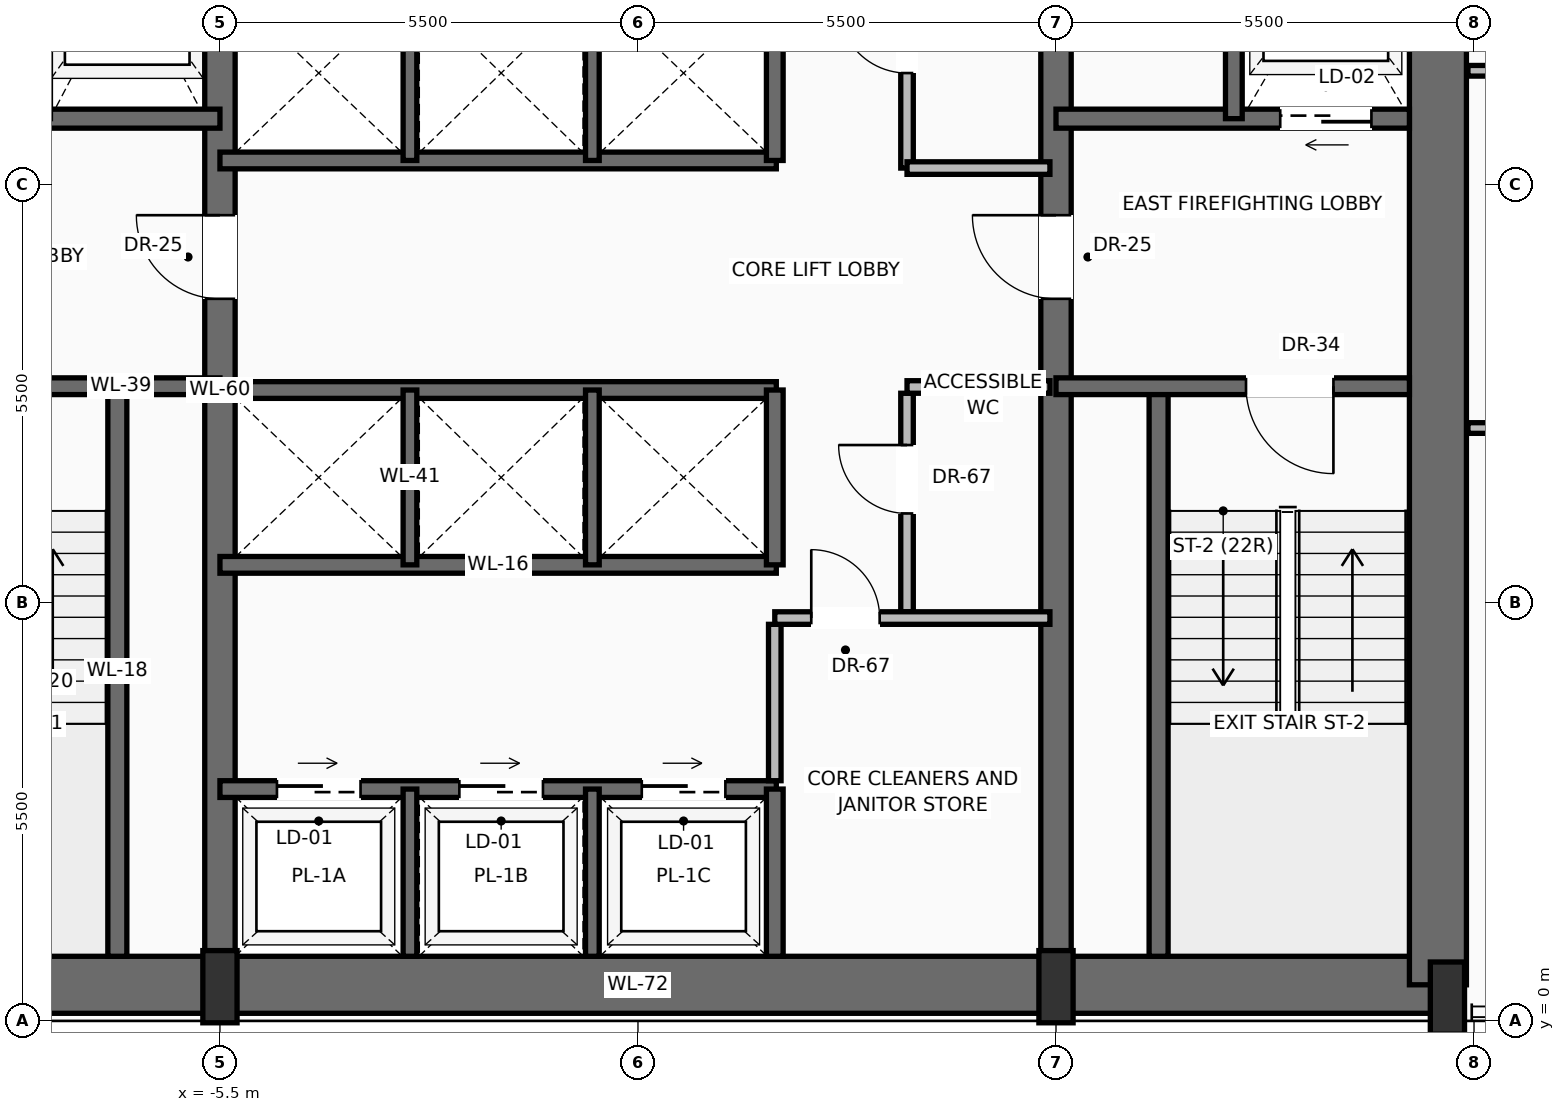
"""IFC4 building model, lengths in metres.
Left out: names, types, materials, properties, quantities, classifications, styles, units other than length and angle.
Written with IfcOpenShell. Run it as: python <this file> out.ifc"""

import sys

from ifc_helpers import new_model, si_unit, direction, frame, frame_2d, origin, origin_2d, place, context, subcontext, project, spatial, rectangle, extrude, source, transform, mapped, element, fill, save


model = new_model("IFC4")
c1 = context("Model", 3, precision=1e-05, world=origin(), true_north=direction((0.0, 1.0)))
c2 = subcontext(c1, "Body", "Model", "MODEL_VIEW")
j1 = project(units=[si_unit("LENGTHUNIT", "METRE"), si_unit("PLANEANGLEUNIT", "RADIAN")], contexts=[c1])
p1 = place(None, origin())
s1 = spatial("IfcSite", under=j1, at=p1, CompositionType="ELEMENT")
p2 = place(p1, origin())
s2 = spatial("IfcBuilding", under=s1, at=p2, CompositionType="ELEMENT")
p3 = place(p2, frame((0.0, 0.0, 113.6)))
s3 = spatial("IfcBuildingStorey", under=s2, at=p3, CompositionType="ELEMENT", Elevation=113.6)
p4 = place(p3, frame((-10.65, 0.475, 0.0), z_axis=(0.0, 0.0, 1.0), x_axis=(1.0, 0.0, 0.0)))
e1 = element("IfcWall", 1, at=p4, inside=s3, PredefinedType="SHEAR", context=c2, shape_type="SweptSolid", body=[
    extrude(rectangle(XDim=21.3, YDim=0.75, at=frame_2d((10.65, 0.0))), origin(), (0.0, 0.0, 1.0), 3.45),
])
p5 = place(p3, frame((10.525, 0.475, 0.0), z_axis=(0.0, 0.0, 1.0), x_axis=(0.0, 1.0, 0.0)))
e2 = element("IfcWall", 2, at=p5, inside=s3, PredefinedType="SHEAR", context=c2, shape_type="SweptSolid", body=[
    extrude(rectangle(XDim=15.65, YDim=0.75, at=frame_2d((7.825, 0.0))), origin(), (0.0, 0.0, 1.0), 3.45),
])
p6 = place(p3, frame((-5.5, 0.475, 0.0), z_axis=(0.0, 0.0, 1.0), x_axis=(0.0, 1.0, 0.0)))
e3 = element("IfcWall", 3, at=p6, inside=s3, PredefinedType="SHEAR", context=c2, shape_type="SweptSolid", body=[
    extrude(rectangle(XDim=15.65, YDim=0.4, at=frame_2d((7.825, 0.0))), origin(), (0.0, 0.0, 1.0), 3.45),
])
p7 = place(p6, frame((9.025, 0.0, 0.0)))
e4 = element("IfcOpeningElement", 4, at=p7, cuts=e3, PredefinedType="OPENING", context=c2, shape_type="SweptSolid", body=[
    extrude(rectangle(XDim=1.1, YDim=2.2, at=frame_2d((0.55, 1.1))), frame((0.0, 0.21, 0.0), z_axis=(0.0, -1.0, 0.0), x_axis=(1.0, 0.0, 0.0)), (0.0, 0.0, 1.0), 0.42),
])
p8 = place(p3, frame((5.5, 0.475, 0.0), z_axis=(0.0, 0.0, 1.0), x_axis=(0.0, 1.0, 0.0)))
e5 = element("IfcWall", 5, at=p8, inside=s3, PredefinedType="SHEAR", context=c2, shape_type="SweptSolid", body=[
    extrude(rectangle(XDim=15.65, YDim=0.4, at=frame_2d((7.825, 0.0))), origin(), (0.0, 0.0, 1.0), 3.45),
])
p9 = place(p8, frame((9.025, 0.0, 0.0)))
e6 = element("IfcOpeningElement", 6, at=p9, cuts=e5, PredefinedType="OPENING", context=c2, shape_type="SweptSolid", body=[
    extrude(rectangle(XDim=1.1, YDim=2.2, at=frame_2d((0.55, 1.1))), frame((0.0, 0.21, 0.0), z_axis=(0.0, -1.0, 0.0), x_axis=(1.0, 0.0, 0.0)), (0.0, 0.0, 1.0), 0.42),
])
m1 = source(origin(), c2, "Body", "SweptSolid", [
    extrude(rectangle(XDim=0.45, YDim=0.95, at=origin_2d()), origin(), (0.0, 0.0, 1.0), 3.7),
])
for number, where, z_axis, x_axis in (
    (7, (-5.5, 0.45, 0.0), (0.0, 0.0, 1.0), (1.0, 0.0, 0.0)),
    (8, (5.5, 0.45, 0.0), (0.0, 0.0, 1.0), (1.0, 0.0, 0.0)),
    (9, (10.65, 0.3, 0.0), (0.0, 0.0, 1.0), (1.0, 0.0, 0.0)),
):
    element("IfcColumn", number, at=place(p3, frame(where, z_axis=z_axis, x_axis=x_axis)), inside=s3, PredefinedType="PILASTER", context=c2, shape_type="MappedRepresentation", body=[
        mapped(m1, transform((0.0, 0.0, 0.0), scale=1.0)),
    ])
p10 = place(p3, frame((-6.85, 0.85, 0.0), z_axis=(0.0, 0.0, 1.0), x_axis=(0.0, 1.0, 0.0)))
e10 = element("IfcWall", 10, at=p10, inside=s3, PredefinedType="SOLIDWALL", context=c2, shape_type="SweptSolid", body=[
    extrude(rectangle(XDim=7.5, YDim=0.25, at=frame_2d((3.75, 0.0))), origin(), (0.0, 0.0, 1.0), 3.45),
])
p11 = place(p3, frame((-5.5, 8.35, 0.0), z_axis=(0.0, 0.0, 1.0), x_axis=(-1.0, 0.0, 0.0)))
e11 = element("IfcWall", 11, at=p11, inside=s3, PredefinedType="SOLIDWALL", context=c2, shape_type="SweptSolid", body=[
    extrude(rectangle(XDim=4.65, YDim=0.22, at=frame_2d((2.325, 0.0))), origin(), (0.0, 0.0, 1.0), 3.45),
])
p12 = place(p11, frame((2.5, 0.0, 0.0)))
e12 = element("IfcOpeningElement", 12, at=p12, cuts=e11, PredefinedType="OPENING", context=c2, shape_type="SweptSolid", body=[
    extrude(rectangle(XDim=1.15, YDim=2.2, at=frame_2d((0.575, 1.1))), frame((0.0, 0.12, 0.0), z_axis=(0.0, -1.0, 0.0), x_axis=(1.0, 0.0, 0.0)), (0.0, 0.0, 1.0), 0.24),
])
p13 = place(p3, frame((-5.5, 11.87, 0.0), z_axis=(0.0, 0.0, 1.0), x_axis=(-1.0, 0.0, 0.0)))
e13 = element("IfcWall", 13, at=p13, inside=s3, PredefinedType="SOLIDWALL", context=c2, shape_type="SweptSolid", body=[
    extrude(rectangle(XDim=4.65, YDim=0.25, at=frame_2d((2.325, 0.0))), origin(), (0.0, 0.0, 1.0), 3.45),
])
p14 = place(p13, frame((2.95, 0.0, 0.0)))
e14 = element("IfcOpeningElement", 14, at=p14, cuts=e13, PredefinedType="OPENING", context=c2, shape_type="SweptSolid", body=[
    extrude(rectangle(XDim=1.2, YDim=2.25, at=frame_2d((0.6, 1.125))), frame((0.0, 0.135, 0.0), z_axis=(0.0, -1.0, 0.0), x_axis=(1.0, 0.0, 0.0)), (0.0, 0.0, 1.0), 0.27),
])
p15 = place(p3, frame((6.85, 0.85, 0.0), z_axis=(0.0, 0.0, 1.0), x_axis=(0.0, 1.0, 0.0)))
e15 = element("IfcWall", 15, at=p15, inside=s3, PredefinedType="SOLIDWALL", context=c2, shape_type="SweptSolid", body=[
    extrude(rectangle(XDim=7.5, YDim=0.25, at=frame_2d((3.75, 0.0))), origin(), (0.0, 0.0, 1.0), 3.45),
])
p16 = place(p3, frame((10.15, 8.35, 0.0), z_axis=(0.0, 0.0, 1.0), x_axis=(-1.0, 0.0, 0.0)))
e16 = element("IfcWall", 16, at=p16, inside=s3, PredefinedType="SOLIDWALL", context=c2, shape_type="SweptSolid", body=[
    extrude(rectangle(XDim=4.65, YDim=0.22, at=frame_2d((2.325, 0.0))), origin(), (0.0, 0.0, 1.0), 3.45),
])
p17 = place(p16, frame((1.0, 0.0, 0.0)))
e17 = element("IfcOpeningElement", 17, at=p17, cuts=e16, PredefinedType="OPENING", context=c2, shape_type="SweptSolid", body=[
    extrude(rectangle(XDim=1.15, YDim=2.2, at=frame_2d((0.575, 1.1))), frame((0.0, 0.12, 0.0), z_axis=(0.0, -1.0, 0.0), x_axis=(1.0, 0.0, 0.0)), (0.0, 0.0, 1.0), 0.24),
])
p18 = place(p3, frame((10.15, 11.87, 0.0), z_axis=(0.0, 0.0, 1.0), x_axis=(-1.0, 0.0, 0.0)))
e18 = element("IfcWall", 18, at=p18, inside=s3, PredefinedType="SOLIDWALL", context=c2, shape_type="SweptSolid", body=[
    extrude(rectangle(XDim=4.65, YDim=0.25, at=frame_2d((2.325, 0.0))), origin(), (0.0, 0.0, 1.0), 3.45),
])
p19 = place(p18, frame((0.5, 0.0, 0.0)))
e19 = element("IfcOpeningElement", 19, at=p19, cuts=e18, PredefinedType="OPENING", context=c2, shape_type="SweptSolid", body=[
    extrude(rectangle(XDim=1.2, YDim=2.25, at=frame_2d((0.6, 1.125))), frame((0.0, 0.135, 0.0), z_axis=(0.0, -1.0, 0.0), x_axis=(1.0, 0.0, 0.0)), (0.0, 0.0, 1.0), 0.27),
])
p20 = place(p3, frame((7.84, 11.87, 0.0), z_axis=(0.0, 0.0, 1.0), x_axis=(0.0, 1.0, 0.0)))
e20 = element("IfcWall", 20, at=p20, inside=s3, PredefinedType="SOLIDWALL", context=c2, shape_type="SweptSolid", body=[
    extrude(rectangle(XDim=3.88, YDim=0.22, at=frame_2d((1.94, 0.0))), origin(), (0.0, 0.0, 1.0), 3.45),
])
p21 = place(p3, frame((-5.5, 3.05, 0.0), z_axis=(0.0, 0.0, 1.0), x_axis=(1.0, 0.0, 0.0)))
e21 = element("IfcWall", 21, at=p21, inside=s3, PredefinedType="SOLIDWALL", context=c2, shape_type="SweptSolid", body=[
    extrude(rectangle(XDim=7.32, YDim=0.22, at=frame_2d((3.66, 0.0))), origin(), (0.0, 0.0, 1.0), 3.45),
])
p22 = place(p21, frame((0.75, 0.0, 0.0)))
e22 = element("IfcOpeningElement", 22, at=p22, cuts=e21, PredefinedType="OPENING", context=c2, shape_type="SweptSolid", body=[
    extrude(rectangle(XDim=1.1, YDim=2.2, at=frame_2d((0.55, 1.1))), frame((0.0, 0.12, 0.0), z_axis=(0.0, -1.0, 0.0), x_axis=(1.0, 0.0, 0.0)), (0.0, 0.0, 1.0), 0.24),
])
p23 = place(p21, frame((3.15, 0.0, 0.0)))
e23 = element("IfcOpeningElement", 23, at=p23, cuts=e21, PredefinedType="OPENING", context=c2, shape_type="SweptSolid", body=[
    extrude(rectangle(XDim=1.1, YDim=2.2, at=frame_2d((0.55, 1.1))), frame((0.0, 0.12, 0.0), z_axis=(0.0, -1.0, 0.0), x_axis=(1.0, 0.0, 0.0)), (0.0, 0.0, 1.0), 0.24),
])
p24 = place(p21, frame((5.55, 0.0, 0.0)))
e24 = element("IfcOpeningElement", 24, at=p24, cuts=e21, PredefinedType="OPENING", context=c2, shape_type="SweptSolid", body=[
    extrude(rectangle(XDim=1.1, YDim=2.2, at=frame_2d((0.55, 1.1))), frame((0.0, 0.12, 0.0), z_axis=(0.0, -1.0, 0.0), x_axis=(1.0, 0.0, 0.0)), (0.0, 0.0, 1.0), 0.24),
])
p25 = place(p3, frame((1.8, 0.85, 0.0), z_axis=(0.0, 0.0, 1.0), x_axis=(0.0, 1.0, 0.0)))
e25 = element("IfcWall", 25, at=p25, inside=s3, PredefinedType="SOLIDWALL", context=c2, shape_type="SweptSolid", body=[
    extrude(rectangle(XDim=2.2, YDim=0.22, at=frame_2d((1.1, 0.0))), origin(), (0.0, 0.0, 1.0), 3.45),
])
for number, where, z_axis, x_axis in (
    (26, (-3.0, 0.85, 0.0), (0.0, 0.0, 1.0), (0.0, 1.0, 0.0)),
    (27, (-0.6, 0.85, 0.0), (0.0, 0.0, 1.0), (0.0, 1.0, 0.0)),
):
    element("IfcWall", number, at=place(p3, frame(where, z_axis=z_axis, x_axis=x_axis)), inside=s3, PredefinedType="SOLIDWALL", context=c2, shape_type="SweptSolid", body=[
        extrude(rectangle(XDim=2.2, YDim=0.18, at=frame_2d((1.1, 0.0))), origin(), (0.0, 0.0, 1.0), 3.45),
    ])
p26 = place(p3, frame((1.8, 3.16, 0.0), z_axis=(0.0, 0.0, 1.0), x_axis=(0.0, 1.0, 0.0)))
e28 = element("IfcWall", 28, at=p26, inside=s3, PredefinedType="PARTITIONING", context=c2, shape_type="SweptSolid", body=[
    extrude(rectangle(XDim=2.058, YDim=0.165, at=frame_2d((1.029, 0.0))), origin(), (0.0, 0.0, 1.0), 3.442),
])
p27 = place(p3, frame((3.54, 5.383, 0.0), z_axis=(0.0, 0.0, 1.0), x_axis=(0.0, 1.0, 0.0)))
e29 = element("IfcWall", 29, at=p27, inside=s3, PredefinedType="PARTITIONING", context=c2, shape_type="SweptSolid", body=[
    extrude(rectangle(XDim=2.875, YDim=0.165, at=frame_2d((1.438, 0.0))), origin(), (0.0, 0.0, 1.0), 3.442),
])
p28 = place(p27, frame((1.294, 0.0, 0.0)))
e30 = element("IfcOpeningElement", 30, at=p28, cuts=e29, PredefinedType="OPENING", context=c2, shape_type="SweptSolid", body=[
    extrude(rectangle(XDim=0.9, YDim=2.1, at=frame_2d((0.45, 1.05))), frame((0.0, 0.093, 0.0), z_axis=(0.0, -1.0, 0.0), x_axis=(1.0, 0.0, 0.0)), (0.0, 0.0, 1.0), 0.185),
])
p29 = place(p3, frame((3.54, 8.34, 0.0), z_axis=(0.0, 0.0, 1.0), x_axis=(1.0, 0.0, 0.0)))
e31 = element("IfcWall", 31, at=p29, inside=s3, PredefinedType="PARTITIONING", context=c2, shape_type="SweptSolid", body=[
    extrude(rectangle(XDim=1.88, YDim=0.165, at=frame_2d((0.94, 0.0))), origin(), (0.0, 0.0, 1.0), 3.442),
])
p30 = place(p3, frame((1.8, 5.3, 0.0), z_axis=(0.0, 0.0, 1.0), x_axis=(1.0, 0.0, 0.0)))
e32 = element("IfcWall", 32, at=p30, inside=s3, PredefinedType="PARTITIONING", context=c2, shape_type="SweptSolid", body=[
    extrude(rectangle(XDim=3.62, YDim=0.165, at=frame_2d((1.81, 0.0))), origin(), (0.0, 0.0, 1.0), 3.442),
])
p31 = place(p30, frame((0.48, 0.0, 0.0)))
e33 = element("IfcOpeningElement", 33, at=p31, cuts=e32, PredefinedType="OPENING", context=c2, shape_type="SweptSolid", body=[
    extrude(rectangle(XDim=0.9, YDim=2.1, at=frame_2d((0.45, 1.05))), frame((0.0, 0.093, 0.0), z_axis=(0.0, -1.0, 0.0), x_axis=(1.0, 0.0, 0.0)), (0.0, 0.0, 1.0), 0.185),
])
for number, where, z_axis, x_axis in (
    (34, (-5.5, 6.0, 0.0), (0.0, 0.0, 1.0), (1.0, 0.0, 0.0)),
    (35, (-5.5, 8.3, 0.0), (0.0, 0.0, 1.0), (1.0, 0.0, 0.0)),
):
    element("IfcWall", number, at=place(p3, frame(where, z_axis=z_axis, x_axis=x_axis)), inside=s3, PredefinedType="SOLIDWALL", context=c2, shape_type="SweptSolid", body=[
        extrude(rectangle(XDim=7.32, YDim=0.22, at=frame_2d((3.66, 0.0))), origin(), (0.0, 0.0, 1.0), 3.45),
    ])
p32 = place(p3, frame((1.8, 6.0, 0.0), z_axis=(0.0, 0.0, 1.0), x_axis=(0.0, 1.0, 0.0)))
e36 = element("IfcWall", 36, at=p32, inside=s3, PredefinedType="SOLIDWALL", context=c2, shape_type="SweptSolid", body=[
    extrude(rectangle(XDim=2.3, YDim=0.22, at=frame_2d((1.15, 0.0))), origin(), (0.0, 0.0, 1.0), 3.45),
])
for number, where, z_axis, x_axis in (
    (37, (-3.0, 6.0, 0.0), (0.0, 0.0, 1.0), (0.0, 1.0, 0.0)),
    (38, (-0.6, 6.0, 0.0), (0.0, 0.0, 1.0), (0.0, 1.0, 0.0)),
):
    element("IfcWall", number, at=place(p3, frame(where, z_axis=z_axis, x_axis=x_axis)), inside=s3, PredefinedType="SOLIDWALL", context=c2, shape_type="SweptSolid", body=[
        extrude(rectangle(XDim=2.3, YDim=0.18, at=frame_2d((1.15, 0.0))), origin(), (0.0, 0.0, 1.0), 3.45),
    ])
p33 = place(p3, frame((-5.5, 11.32, 0.0), z_axis=(0.0, 0.0, 1.0), x_axis=(1.0, 0.0, 0.0)))
e39 = element("IfcWall", 39, at=p33, inside=s3, PredefinedType="SOLIDWALL", context=c2, shape_type="SweptSolid", body=[
    extrude(rectangle(XDim=7.32, YDim=0.22, at=frame_2d((3.66, 0.0))), origin(), (0.0, 0.0, 1.0), 3.45),
])
p34 = place(p3, frame((1.8, 11.32, 0.0), z_axis=(0.0, 0.0, 1.0), x_axis=(0.0, 1.0, 0.0)))
e40 = element("IfcWall", 40, at=p34, inside=s3, PredefinedType="SOLIDWALL", context=c2, shape_type="SweptSolid", body=[
    extrude(rectangle(XDim=2.3, YDim=0.22, at=frame_2d((1.15, 0.0))), origin(), (0.0, 0.0, 1.0), 3.45),
])
for number, where, z_axis, x_axis in (
    (41, (-3.0, 11.32, 0.0), (0.0, 0.0, 1.0), (0.0, 1.0, 0.0)),
    (42, (-0.6, 11.32, 0.0), (0.0, 0.0, 1.0), (0.0, 1.0, 0.0)),
):
    element("IfcWall", number, at=place(p3, frame(where, z_axis=z_axis, x_axis=x_axis)), inside=s3, PredefinedType="SOLIDWALL", context=c2, shape_type="SweptSolid", body=[
        extrude(rectangle(XDim=2.3, YDim=0.18, at=frame_2d((1.15, 0.0))), origin(), (0.0, 0.0, 1.0), 3.45),
    ])
p35 = place(p3, frame((3.54, 11.22, 0.0), z_axis=(0.0, 0.0, 1.0), x_axis=(0.0, 1.0, 0.0)))
e43 = element("IfcWall", 43, at=p35, inside=s3, PredefinedType="PARTITIONING", context=c2, shape_type="SweptSolid", body=[
    extrude(rectangle(XDim=4.53, YDim=0.165, at=frame_2d((2.265, 0.0))), origin(), (0.0, 0.0, 1.0), 3.442),
])
p36 = place(p35, frame((1.25, 0.0, 0.0)))
e44 = element("IfcOpeningElement", 44, at=p36, cuts=e43, PredefinedType="OPENING", context=c2, shape_type="SweptSolid", body=[
    extrude(rectangle(XDim=0.9, YDim=2.1, at=frame_2d((0.45, 1.05))), frame((0.0, 0.093, 0.0), z_axis=(0.0, -1.0, 0.0), x_axis=(1.0, 0.0, 0.0)), (0.0, 0.0, 1.0), 0.185),
])
p37 = place(p3, frame((3.54, 11.22, 0.0), z_axis=(0.0, 0.0, 1.0), x_axis=(1.0, 0.0, 0.0)))
e45 = element("IfcWall", 45, at=p37, inside=s3, PredefinedType="PARTITIONING", context=c2, shape_type="SweptSolid", body=[
    extrude(rectangle(XDim=1.88, YDim=0.165, at=frame_2d((0.94, 0.0))), origin(), (0.0, 0.0, 1.0), 3.442),
])
p38 = place(p3, frame((10.92, 7.8, 0.0), z_axis=(0.0, 0.0, 1.0), x_axis=(1.0, 0.0, 0.0)))
e46 = element("IfcWall", 46, at=p38, inside=s3, PredefinedType="PARTITIONING", context=c2, shape_type="SweptSolid", body=[
    extrude(rectangle(XDim=16.441, YDim=0.14, at=frame_2d((8.221, 0.0))), origin(), (0.0, 0.0, 1.0), 3.442),
])
p39 = place(p38, frame((7.735, 0.0, 0.0)))
e47 = element("IfcOpeningElement", 47, at=p39, cuts=e46, PredefinedType="OPENING", context=c2, shape_type="SweptSolid", body=[
    extrude(rectangle(XDim=0.95, YDim=2.2, at=frame_2d((0.475, 1.1))), frame((0.0, 0.08, 0.0), z_axis=(0.0, -1.0, 0.0), x_axis=(1.0, 0.0, 0.0)), (0.0, 0.0, 1.0), 0.16),
])
p40 = place(p3, frame((10.92, 12.5, 0.0), z_axis=(0.0, 0.0, 1.0), x_axis=(1.0, 0.0, 0.0)))
e48 = element("IfcWall", 48, at=p40, inside=s3, PredefinedType="PARTITIONING", context=c2, shape_type="SweptSolid", body=[
    extrude(rectangle(XDim=14.362, YDim=0.14, at=frame_2d((7.181, 0.0))), origin(), (0.0, 0.0, 1.0), 3.442),
])
p41 = place(p40, frame((6.698, 0.0, 0.0)))
e49 = element("IfcOpeningElement", 49, at=p41, cuts=e48, PredefinedType="OPENING", context=c2, shape_type="SweptSolid", body=[
    extrude(rectangle(XDim=0.95, YDim=2.2, at=frame_2d((0.475, 1.1))), frame((0.0, 0.08, 0.0), z_axis=(0.0, -1.0, 0.0), x_axis=(1.0, 0.0, 0.0)), (0.0, 0.0, 1.0), 0.16),
])
m2 = source(origin(), c2, "Body", "SweptSolid", [
    extrude(rectangle(XDim=1.1, YDim=2.2, at=frame_2d((0.55, 1.1))), frame((0.0, 0.025, 0.0), z_axis=(0.0, -1.0, 0.0), x_axis=(1.0, 0.0, 0.0)), (0.0, 0.0, 1.0), 0.05),
])
p42 = place(p7, origin())
e50 = element("IfcDoor", 50, at=p42, inside=s3, OperationType="SINGLE_SWING_RIGHT", PredefinedType="DOOR", context=c2, shape_type="MappedRepresentation", body=[
    mapped(m2, transform((0.0, 0.0, 0.0), scale=1.0)),
])
fill(e4, e50)
m3 = source(origin(), c2, "Body", "SweptSolid", [
    extrude(rectangle(XDim=1.15, YDim=2.2, at=frame_2d((0.575, 1.1))), frame((0.0, 0.025, 0.0), z_axis=(0.0, -1.0, 0.0), x_axis=(1.0, 0.0, 0.0)), (0.0, 0.0, 1.0), 0.05),
])
p43 = place(p17, origin())
e51 = element("IfcDoor", 51, at=p43, inside=s3, OperationType="SINGLE_SWING_LEFT", PredefinedType="DOOR", context=c2, shape_type="MappedRepresentation", body=[
    mapped(m3, transform((0.0, 0.0, 0.0), scale=1.0)),
])
fill(e17, e51)
p44 = place(p9, origin())
e52 = element("IfcDoor", 52, at=p44, inside=s3, OperationType="SINGLE_SWING_RIGHT", PredefinedType="DOOR", context=c2, shape_type="MappedRepresentation", body=[
    mapped(m2, transform((0.0, 0.0, 0.0), scale=1.0)),
])
fill(e6, e52)
m4 = source(origin(), c2, "Body", "SweptSolid", [
    extrude(rectangle(XDim=1.2, YDim=2.25, at=frame_2d((0.6, 1.125))), frame((0.0, 0.025, 0.0), z_axis=(0.0, -1.0, 0.0), x_axis=(1.0, 0.0, 0.0)), (0.0, 0.0, 1.0), 0.05),
])
p45 = place(p19, origin())
e53 = element("IfcDoor", 53, at=p45, inside=s3, OperationType="SLIDING_TO_RIGHT", PredefinedType="DOOR", context=c2, shape_type="MappedRepresentation", body=[
    mapped(m4, transform((0.0, 0.0, 0.0), scale=1.0)),
])
fill(e19, e53)
m5 = source(origin(), c2, "Body", "SweptSolid", [
    extrude(rectangle(XDim=1.1, YDim=2.2, at=frame_2d((0.55, 1.1))), frame((0.0, 0.025, 0.0), z_axis=(0.0, -1.0, 0.0), x_axis=(1.0, 0.0, 0.0)), (0.0, 0.0, 1.0), 0.05),
])
p46 = place(p22, origin())
e54 = element("IfcDoor", 54, at=p46, inside=s3, OperationType="SLIDING_TO_RIGHT", PredefinedType="DOOR", context=c2, shape_type="MappedRepresentation", body=[
    mapped(m5, transform((0.0, 0.0, 0.0), scale=1.0)),
])
fill(e22, e54)
p47 = place(p23, origin())
e55 = element("IfcDoor", 55, at=p47, inside=s3, OperationType="SLIDING_TO_RIGHT", PredefinedType="DOOR", context=c2, shape_type="MappedRepresentation", body=[
    mapped(m5, transform((0.0, 0.0, 0.0), scale=1.0)),
])
fill(e23, e55)
p48 = place(p24, origin())
e56 = element("IfcDoor", 56, at=p48, inside=s3, OperationType="SLIDING_TO_RIGHT", PredefinedType="DOOR", context=c2, shape_type="MappedRepresentation", body=[
    mapped(m5, transform((0.0, 0.0, 0.0), scale=1.0)),
])
fill(e24, e56)
m6 = source(origin(), c2, "Body", "SweptSolid", [
    extrude(rectangle(XDim=0.9, YDim=2.1, at=frame_2d((0.45, 1.05))), frame((0.0, 0.025, 0.0), z_axis=(0.0, -1.0, 0.0), x_axis=(1.0, 0.0, 0.0)), (0.0, 0.0, 1.0), 0.05),
])
p49 = place(p31, origin())
e57 = element("IfcDoor", 57, at=p49, inside=s3, OperationType="SINGLE_SWING_LEFT", PredefinedType="DOOR", context=c2, shape_type="MappedRepresentation", body=[
    mapped(m6, transform((0.0, 0.0, 0.0), scale=1.0)),
])
fill(e33, e57)
p50 = place(p28, origin())
e58 = element("IfcDoor", 58, at=p50, inside=s3, OperationType="SINGLE_SWING_RIGHT", PredefinedType="DOOR", context=c2, shape_type="MappedRepresentation", body=[
    mapped(m6, transform((0.0, 0.0, 0.0), scale=1.0)),
])
fill(e30, e58)
p51 = place(p36, origin())
e59 = element("IfcDoor", 59, at=p51, inside=s3, OperationType="SINGLE_SWING_RIGHT", PredefinedType="DOOR", context=c2, shape_type="MappedRepresentation", body=[
    mapped(m6, transform((0.0, 0.0, 0.0), scale=1.0)),
])
fill(e44, e59)
save(model, sys.argv[1])
